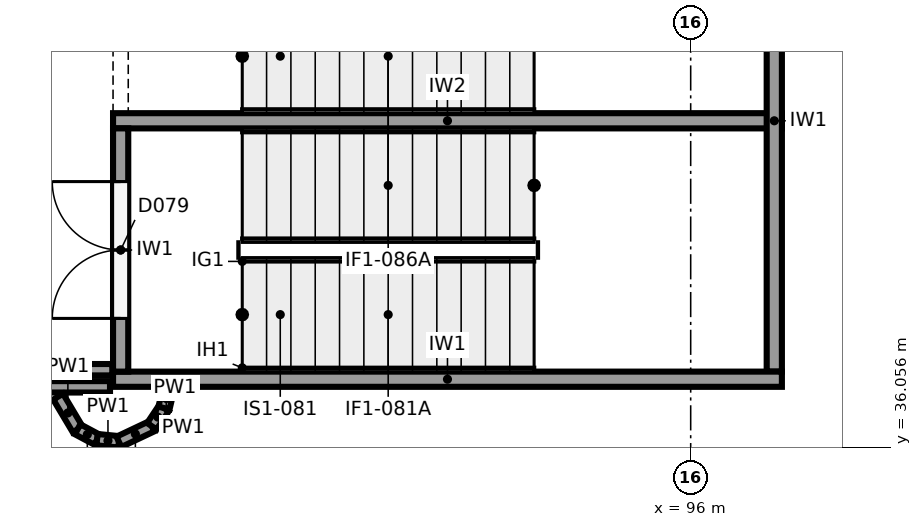
"""IFC4 building model, lengths in metres.
Left out: names, types, materials, properties, quantities, classifications, styles, units other than length and angle.
Written with IfcOpenShell. Run it as: python <this file> out.ifc"""

import sys

from ifc_helpers import new_model, si_unit, direction, frame, frame_2d, origin, place, context, subcontext, project, spatial, rectangle, extrude, element, fill, save


model = new_model("IFC4")
c1 = context("Model", 3, precision=1e-05, world=origin(), true_north=direction((0.0, 1.0)))
c2 = subcontext(c1, "Body", "Model", "MODEL_VIEW")
j1 = project(units=[si_unit("LENGTHUNIT", "METRE"), si_unit("PLANEANGLEUNIT", "RADIAN")], contexts=[c1])
p1 = place(None, origin())
s1 = spatial("IfcSite", under=j1, at=p1, CompositionType="ELEMENT")
p2 = place(p1, origin())
s2 = spatial("IfcBuilding", under=s1, at=p2, CompositionType="ELEMENT")
p3 = place(p2, frame((0.0, 0.0, -4.0)))
s3 = spatial("IfcBuildingStorey", under=s2, at=p3, CompositionType="ELEMENT", Elevation=-4.0)
p4 = place(p3, frame((97.2, 36.95, -1.2), z_axis=(0.0, 0.0, 1.0), x_axis=(-1.0, 0.0, 0.0)))
e1 = element("IfcWall", 1, at=p4, inside=s3, PredefinedType="SHEAR", context=c2, shape_type="SweptSolid", body=[
    extrude(rectangle(XDim=8.8, YDim=0.2, at=frame_2d((4.4, 0.0))), origin(), (0.0, 0.0, 1.0), 4.8),
])
p5 = place(p3, frame((97.1, 37.05, -1.2), z_axis=(0.0, 0.0, 1.0), x_axis=(0.0, 1.0, 0.0)))
e2 = element("IfcWall", 2, at=p5, inside=s3, PredefinedType="SHEAR", context=c2, shape_type="SweptSolid", body=[
    extrude(rectangle(XDim=6.6, YDim=0.2, at=frame_2d((3.3, 0.0))), origin(), (0.0, 0.0, 1.0), 4.8),
])
p6 = place(p3, frame((97.2, 40.35, -1.2), z_axis=(0.0, 0.0, 1.0), x_axis=(-1.0, 0.0, 0.0)))
e3 = element("IfcWall", 3, at=p6, inside=s3, PredefinedType="SHEAR", context=c2, shape_type="SweptSolid", body=[
    extrude(rectangle(XDim=8.8, YDim=0.2, at=frame_2d((4.4, 0.0))), origin(), (0.0, 0.0, 1.0), 4.8),
])
p7 = place(p3, frame((88.5, 37.05, -1.2), z_axis=(0.0, 0.0, 1.0), x_axis=(0.0, 1.0, 0.0)))
e4 = element("IfcWall", 4, at=p7, inside=s3, PredefinedType="SHEAR", context=c2, shape_type="SweptSolid", body=[
    extrude(rectangle(XDim=3.2, YDim=0.2, at=frame_2d((1.6, 0.0))), origin(), (0.0, 0.0, 1.0), 4.8),
])
p8 = place(p7, frame((0.7, 0.0, 1.2)))
e5 = element("IfcOpeningElement", 5, at=p8, cuts=e4, PredefinedType="OPENING", context=c2, shape_type="SweptSolid", body=[
    extrude(rectangle(XDim=1.8, YDim=2.1, at=frame_2d((0.9, 1.05))), frame((0.0, 0.11, 0.0), z_axis=(0.0, -1.0, 0.0), x_axis=(1.0, 0.0, 0.0)), (0.0, 0.0, 1.0), 0.22),
])
p9 = place(p3, frame((88.5, 40.45, -1.2), z_axis=(0.0, 0.0, 1.0), x_axis=(0.0, 1.0, 0.0)))
e6 = element("IfcWall", 6, at=p9, inside=s3, PredefinedType="SHEAR", context=c2, shape_type="SweptSolid", body=[
    extrude(rectangle(XDim=3.2, YDim=0.2, at=frame_2d((1.6, 0.0))), origin(), (0.0, 0.0, 1.0), 4.8),
])
p10 = place(p9, frame((0.7, 0.0, 1.2)))
e7 = element("IfcOpeningElement", 7, at=p10, cuts=e6, PredefinedType="OPENING", context=c2, shape_type="SweptSolid", body=[
    extrude(rectangle(XDim=1.8, YDim=2.1, at=frame_2d((0.9, 1.05))), frame((0.0, 0.11, 0.0), z_axis=(0.0, -1.0, 0.0), x_axis=(1.0, 0.0, 0.0)), (0.0, 0.0, 1.0), 0.22),
])
p11 = place(p3, frame((85.377, 36.85, 0.0), z_axis=(0.0, 0.0, 1.0), x_axis=(1.0, 0.0, 0.0)))
e8 = element("IfcWall", 8, at=p11, inside=s3, PredefinedType="PARTITIONING", context=c2, shape_type="SweptSolid", body=[
    extrude(rectangle(XDim=2.983, YDim=0.15, at=frame_2d((1.491, 0.0))), origin(), (0.0, 0.0, 1.0), 3.6),
])
p12 = place(p3, frame((85.96, 37.075, 0.0), z_axis=(0.0, 0.0, 1.0), x_axis=(1.0, 0.0, 0.0)))
e9 = element("IfcWall", 9, at=p12, inside=s3, PredefinedType="PARTITIONING", context=c2, shape_type="SweptSolid", body=[
    extrude(rectangle(XDim=2.43, YDim=0.15, at=frame_2d((1.215, 0.0))), origin(), (0.0, 0.0, 1.0), 3.6),
])
p13 = place(p3, frame((87.677, 36.721, 0.0), z_axis=(0.0, 0.0, 1.0), x_axis=(0.513060623194, -0.858352373404, 0.0)))
e10 = element("IfcWall", 10, at=p13, inside=s3, PredefinedType="PARTITIONING", context=c2, shape_type="SweptSolid", body=[
    extrude(rectangle(XDim=0.5, YDim=0.15, at=frame_2d((0.25, 0.0))), origin(), (0.0, 0.0, 1.0), 3.6),
])
for number, where, z_axis, x_axis in (
    (11, (87.934, 36.291, 0.0), (0.0, 0.0, 1.0), (0.882, -0.472, 0.0)),
    (12, (88.189, 36.155, 0.0), (0.0, 0.0, 1.0), (0.995, -0.098, 0.0)),
):
    element("IfcWall", number, at=place(p3, frame(where, z_axis=z_axis, x_axis=x_axis)), inside=s3, PredefinedType="PARTITIONING", context=c2, shape_type="SweptSolid", body=[
        extrude(rectangle(XDim=0.289, YDim=0.15, at=frame_2d((0.145, 0.0))), origin(), (0.0, 0.0, 1.0), 3.6),
    ])
p14 = place(p3, frame((88.477, 36.126, 0.0), z_axis=(0.0, 0.0, 1.0), x_axis=(0.903893315025, 0.427757963167, 0.0)))
e13 = element("IfcWall", 13, at=p14, inside=s3, PredefinedType="PARTITIONING", context=c2, shape_type="SweptSolid", body=[
    extrude(rectangle(XDim=0.479, YDim=0.15, at=frame_2d((0.24, 0.0))), origin(), (0.0, 0.0, 1.0), 3.6),
])
p15 = place(p3, frame((88.91, 36.332, 0.0), z_axis=(0.0, 0.0, 1.0), x_axis=(0.555678694372, 0.831397130511, 0.0)))
e14 = element("IfcWall", 14, at=p15, inside=s3, PredefinedType="PARTITIONING", context=c2, shape_type="SweptSolid", body=[
    extrude(rectangle(XDim=0.288, YDim=0.15, at=frame_2d((0.144, 0.0))), origin(), (0.0, 0.0, 1.0), 3.6),
])
p16 = place(p3, frame((89.07, 36.571, 0.0), z_axis=(0.0, 0.0, 1.0), x_axis=(0.231150896285, 0.972917911823, 0.0)))
e15 = element("IfcWall", 15, at=p16, inside=s3, PredefinedType="PARTITIONING", context=c2, shape_type="SweptSolid", body=[
    extrude(rectangle(XDim=0.258, YDim=0.15, at=frame_2d((0.129, 0.0))), origin(), (0.0, 0.0, 1.0), 3.6),
])
p17 = place(p8, origin())
e16 = element("IfcDoor", 16, at=p17, inside=s3, OperationType="DOUBLE_DOOR_SINGLE_SWING", PredefinedType="DOOR", context=c2, shape_type="SweptSolid", body=[
    extrude(rectangle(XDim=1.8, YDim=2.1, at=frame_2d((0.9, 1.05))), frame((0.0, 0.025, 0.0), z_axis=(0.0, -1.0, 0.0), x_axis=(1.0, 0.0, 0.0)), (0.0, 0.0, 1.0), 0.05),
])
fill(e5, e16)
p18 = place(p10, origin())
e17 = element("IfcDoor", 17, at=p18, inside=s3, OperationType="DOUBLE_DOOR_SINGLE_SWING", PredefinedType="DOOR", context=c2, shape_type="SweptSolid", body=[
    extrude(rectangle(XDim=1.8, YDim=2.1, at=frame_2d((0.9, 1.05))), frame((0.0, 0.025, 0.0), z_axis=(0.0, -1.0, 0.0), x_axis=(1.0, 0.0, 0.0)), (0.0, 0.0, 1.0), 0.05),
])
fill(e7, e17)
save(model, sys.argv[1])
